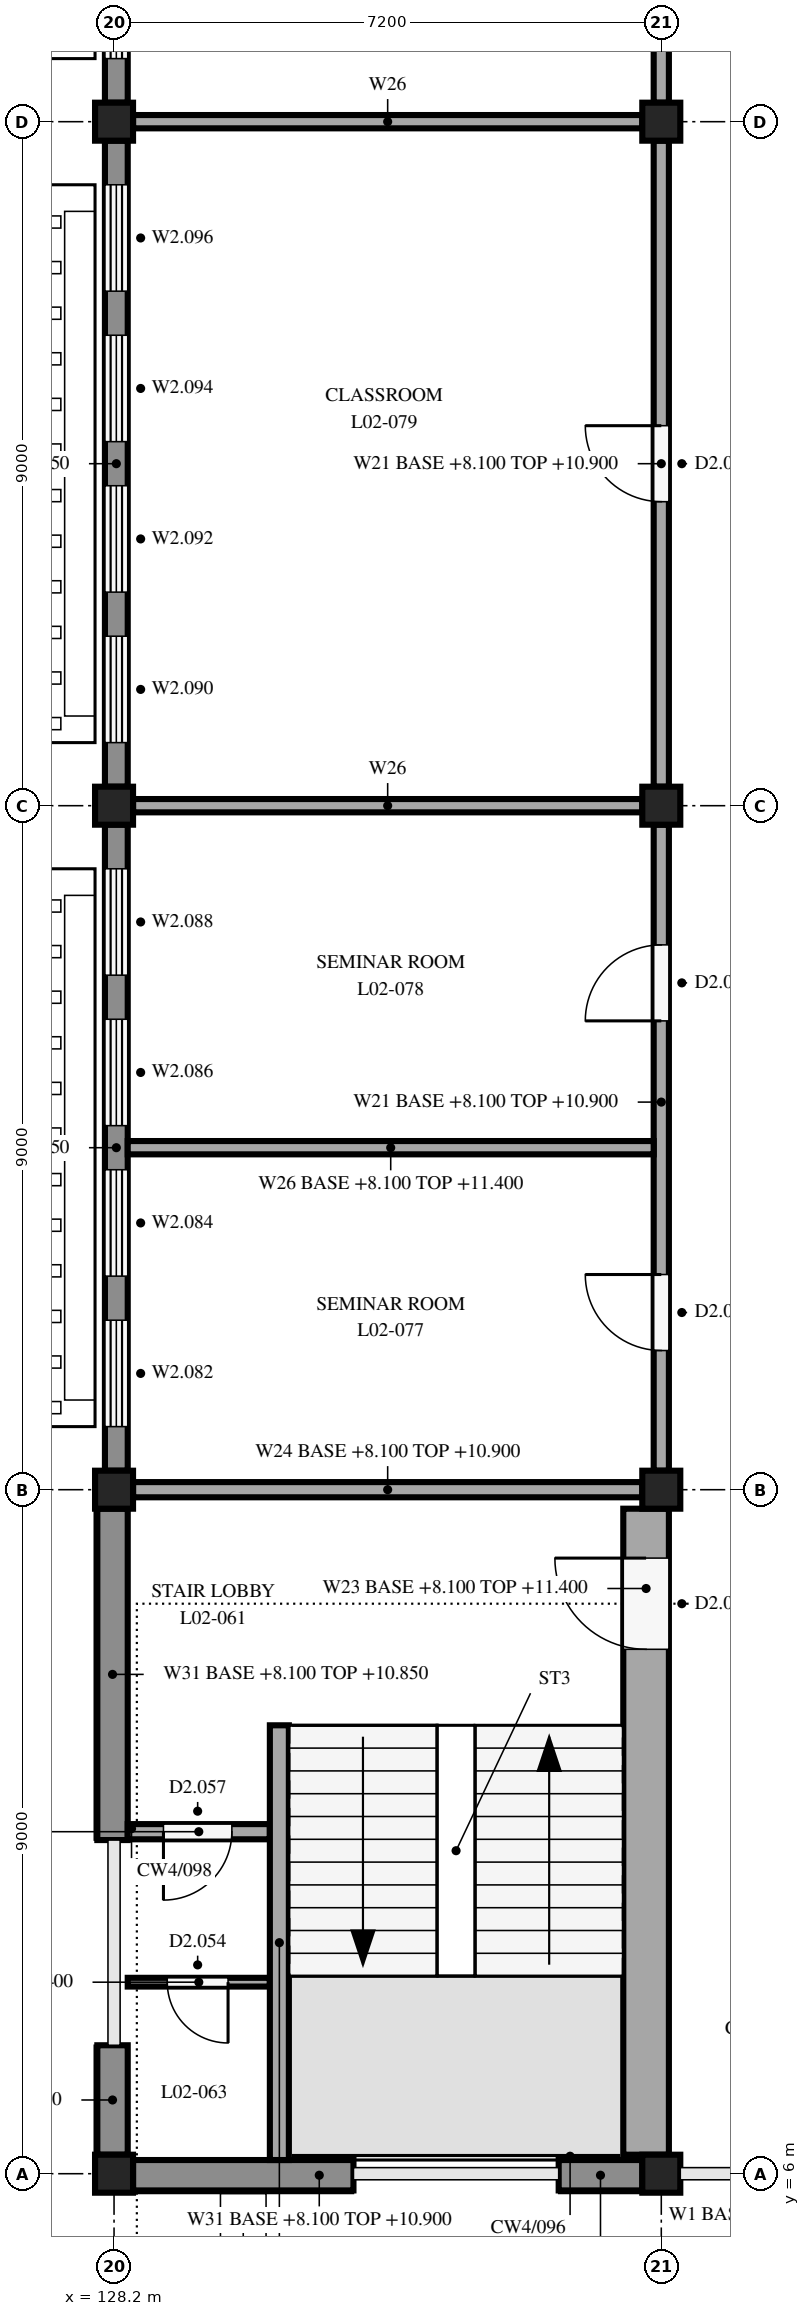
"""IFC4 building model, lengths in metres.
Left out: names, types, materials, properties, quantities, classifications, styles, units other than length and angle.
Written with IfcOpenShell. Run it as: python <this file> out.ifc"""

import sys

from ifc_helpers import new_model, si_unit, direction, frame, frame_2d, origin, origin_2d, place, context, subcontext, project, spatial, rectangle, extrude, element, fill, save


model = new_model("IFC4")
c1 = context("Model", 3, precision=1e-05, world=origin(), true_north=direction((0.0, 1.0)))
c2 = subcontext(c1, "Body", "Model", "MODEL_VIEW")
j1 = project(units=[si_unit("LENGTHUNIT", "METRE"), si_unit("PLANEANGLEUNIT", "RADIAN")], contexts=[c1])
p1 = place(None, origin())
s1 = spatial("IfcSite", under=j1, at=p1, CompositionType="ELEMENT")
p2 = place(p1, origin())
s2 = spatial("IfcBuilding", under=s1, at=p2, CompositionType="ELEMENT")
p3 = place(p2, frame((0.0, 0.0, 8.1)))
s3 = spatial("IfcBuildingStorey", under=s2, at=p3, CompositionType="ELEMENT", Elevation=8.1)
for number, where, z_axis, x_axis in (
    (1, (128.2, 6.0, 0.0), (0.0, 0.0, 1.0), (1.0, 0.0, 0.0)),
    (2, (128.2, 15.0, 0.0), (0.0, 0.0, 1.0), (1.0, 0.0, 0.0)),
    (3, (128.2, 24.0, 0.0), (0.0, 0.0, 1.0), (1.0, 0.0, 0.0)),
    (4, (128.2, 33.0, 0.0), (0.0, 0.0, 1.0), (1.0, 0.0, 0.0)),
    (5, (135.4, 6.0, 0.0), (0.0, 0.0, 1.0), (1.0, 0.0, 0.0)),
    (6, (135.4, 15.0, 0.0), (0.0, 0.0, 1.0), (1.0, 0.0, 0.0)),
    (7, (135.4, 24.0, 0.0), (0.0, 0.0, 1.0), (1.0, 0.0, 0.0)),
    (8, (135.4, 33.0, 0.0), (0.0, 0.0, 1.0), (1.0, 0.0, 0.0)),
):
    element("IfcColumn", number, at=place(p3, frame(where, z_axis=z_axis, x_axis=x_axis)), inside=s3, PredefinedType="COLUMN", context=c2, shape_type="SweptSolid", body=[
        extrude(rectangle(XDim=0.5, YDim=0.5, at=origin_2d()), origin(), (0.0, 0.0, 1.0), 3.3),
    ])
p4 = place(p3, frame((128.18, 6.25, 0.0), z_axis=(0.0, 0.0, 1.0), x_axis=(0.0, 1.0, 0.0)))
e9 = element("IfcWall", 9, at=p4, inside=s3, PredefinedType="STANDARD", context=c2, shape_type="SweptSolid", body=[
    extrude(rectangle(XDim=1.44, YDim=0.4, at=frame_2d((0.72, 0.0))), origin(), (0.0, 0.0, 1.0), 2.75),
])
p5 = place(p3, frame((128.18, 10.39, 0.0), z_axis=(0.0, 0.0, 1.0), x_axis=(0.0, 1.0, 0.0)))
e10 = element("IfcWall", 10, at=p5, inside=s3, PredefinedType="STANDARD", context=c2, shape_type="SweptSolid", body=[
    extrude(rectangle(XDim=4.36, YDim=0.4, at=frame_2d((2.18, 0.0))), origin(), (0.0, 0.0, 1.0), 2.75),
])
p6 = place(p3, frame((128.23, 15.25, 0.0), z_axis=(0.0, 0.0, 1.0), x_axis=(0.0, 1.0, 0.0)))
e11 = element("IfcWall", 11, at=p6, inside=s3, PredefinedType="STANDARD", context=c2, shape_type="SweptSolid", body=[
    extrude(rectangle(XDim=8.5, YDim=0.3, at=frame_2d((4.25, 0.0))), origin(), (0.0, 0.0, 1.0), 2.75),
])
p7 = place(p6, frame((0.58, 0.0, 0.6)))
e12 = element("IfcOpeningElement", 12, at=p7, cuts=e11, PredefinedType="OPENING", context=c2, shape_type="SweptSolid", body=[
    extrude(rectangle(XDim=1.4, YDim=2.1, at=frame_2d((0.7, 1.05))), frame((0.0, 0.16, 0.0), z_axis=(0.0, -1.0, 0.0), x_axis=(1.0, 0.0, 0.0)), (0.0, 0.0, 1.0), 0.32),
])
p8 = place(p6, frame((2.56, 0.0, 0.6)))
e13 = element("IfcOpeningElement", 13, at=p8, cuts=e11, PredefinedType="OPENING", context=c2, shape_type="SweptSolid", body=[
    extrude(rectangle(XDim=1.4, YDim=2.1, at=frame_2d((0.7, 1.05))), frame((0.0, 0.16, 0.0), z_axis=(0.0, -1.0, 0.0), x_axis=(1.0, 0.0, 0.0)), (0.0, 0.0, 1.0), 0.32),
])
p9 = place(p6, frame((4.54, 0.0, 0.6)))
e14 = element("IfcOpeningElement", 14, at=p9, cuts=e11, PredefinedType="OPENING", context=c2, shape_type="SweptSolid", body=[
    extrude(rectangle(XDim=1.4, YDim=2.1, at=frame_2d((0.7, 1.05))), frame((0.0, 0.16, 0.0), z_axis=(0.0, -1.0, 0.0), x_axis=(1.0, 0.0, 0.0)), (0.0, 0.0, 1.0), 0.32),
])
p10 = place(p6, frame((6.52, 0.0, 0.6)))
e15 = element("IfcOpeningElement", 15, at=p10, cuts=e11, PredefinedType="OPENING", context=c2, shape_type="SweptSolid", body=[
    extrude(rectangle(XDim=1.4, YDim=2.1, at=frame_2d((0.7, 1.05))), frame((0.0, 0.16, 0.0), z_axis=(0.0, -1.0, 0.0), x_axis=(1.0, 0.0, 0.0)), (0.0, 0.0, 1.0), 0.32),
])
p11 = place(p3, frame((128.23, 24.25, 0.0), z_axis=(0.0, 0.0, 1.0), x_axis=(0.0, 1.0, 0.0)))
e16 = element("IfcWall", 16, at=p11, inside=s3, PredefinedType="STANDARD", context=c2, shape_type="SweptSolid", body=[
    extrude(rectangle(XDim=8.5, YDim=0.3, at=frame_2d((4.25, 0.0))), origin(), (0.0, 0.0, 1.0), 2.75),
])
p12 = place(p11, frame((0.58, 0.0, 0.6)))
e17 = element("IfcOpeningElement", 17, at=p12, cuts=e16, PredefinedType="OPENING", context=c2, shape_type="SweptSolid", body=[
    extrude(rectangle(XDim=1.4, YDim=2.1, at=frame_2d((0.7, 1.05))), frame((0.0, 0.16, 0.0), z_axis=(0.0, -1.0, 0.0), x_axis=(1.0, 0.0, 0.0)), (0.0, 0.0, 1.0), 0.32),
])
p13 = place(p11, frame((2.56, 0.0, 0.6)))
e18 = element("IfcOpeningElement", 18, at=p13, cuts=e16, PredefinedType="OPENING", context=c2, shape_type="SweptSolid", body=[
    extrude(rectangle(XDim=1.4, YDim=2.1, at=frame_2d((0.7, 1.05))), frame((0.0, 0.16, 0.0), z_axis=(0.0, -1.0, 0.0), x_axis=(1.0, 0.0, 0.0)), (0.0, 0.0, 1.0), 0.32),
])
p14 = place(p11, frame((4.54, 0.0, 0.6)))
e19 = element("IfcOpeningElement", 19, at=p14, cuts=e16, PredefinedType="OPENING", context=c2, shape_type="SweptSolid", body=[
    extrude(rectangle(XDim=1.4, YDim=2.1, at=frame_2d((0.7, 1.05))), frame((0.0, 0.16, 0.0), z_axis=(0.0, -1.0, 0.0), x_axis=(1.0, 0.0, 0.0)), (0.0, 0.0, 1.0), 0.32),
])
p15 = place(p11, frame((6.52, 0.0, 0.6)))
e20 = element("IfcOpeningElement", 20, at=p15, cuts=e16, PredefinedType="OPENING", context=c2, shape_type="SweptSolid", body=[
    extrude(rectangle(XDim=1.4, YDim=2.1, at=frame_2d((0.7, 1.05))), frame((0.0, 0.16, 0.0), z_axis=(0.0, -1.0, 0.0), x_axis=(1.0, 0.0, 0.0)), (0.0, 0.0, 1.0), 0.32),
])
p16 = place(p3, frame((128.23, 33.25, 0.0), z_axis=(0.0, 0.0, 1.0), x_axis=(0.0, 1.0, 0.0)))
e21 = element("IfcWall", 21, at=p16, inside=s3, PredefinedType="STANDARD", context=c2, shape_type="SweptSolid", body=[
    extrude(rectangle(XDim=8.5, YDim=0.3, at=frame_2d((4.25, 0.0))), origin(), (0.0, 0.0, 1.0), 2.75),
])
p17 = place(p16, frame((0.58, 0.0, 0.6)))
e22 = element("IfcOpeningElement", 22, at=p17, cuts=e21, PredefinedType="OPENING", context=c2, shape_type="SweptSolid", body=[
    extrude(rectangle(XDim=1.4, YDim=2.1, at=frame_2d((0.7, 1.05))), frame((0.0, 0.16, 0.0), z_axis=(0.0, -1.0, 0.0), x_axis=(1.0, 0.0, 0.0)), (0.0, 0.0, 1.0), 0.32),
])
p18 = place(p16, frame((2.56, 0.0, 0.6)))
e23 = element("IfcOpeningElement", 23, at=p18, cuts=e21, PredefinedType="OPENING", context=c2, shape_type="SweptSolid", body=[
    extrude(rectangle(XDim=1.4, YDim=2.1, at=frame_2d((0.7, 1.05))), frame((0.0, 0.16, 0.0), z_axis=(0.0, -1.0, 0.0), x_axis=(1.0, 0.0, 0.0)), (0.0, 0.0, 1.0), 0.32),
])
p19 = place(p16, frame((4.54, 0.0, 0.6)))
e24 = element("IfcOpeningElement", 24, at=p19, cuts=e21, PredefinedType="OPENING", context=c2, shape_type="SweptSolid", body=[
    extrude(rectangle(XDim=1.4, YDim=2.1, at=frame_2d((0.7, 1.05))), frame((0.0, 0.16, 0.0), z_axis=(0.0, -1.0, 0.0), x_axis=(1.0, 0.0, 0.0)), (0.0, 0.0, 1.0), 0.32),
])
p20 = place(p16, frame((6.52, 0.0, 0.6)))
e25 = element("IfcOpeningElement", 25, at=p20, cuts=e21, PredefinedType="OPENING", context=c2, shape_type="SweptSolid", body=[
    extrude(rectangle(XDim=1.4, YDim=2.1, at=frame_2d((0.7, 1.05))), frame((0.0, 0.16, 0.0), z_axis=(0.0, -1.0, 0.0), x_axis=(1.0, 0.0, 0.0)), (0.0, 0.0, 1.0), 0.32),
])
p21 = place(p3, frame((131.35, 5.98, 0.0), z_axis=(0.0, 0.0, 1.0), x_axis=(-1.0, 0.0, 0.0)))
e26 = element("IfcWall", 26, at=p21, inside=s3, PredefinedType="STANDARD", context=c2, shape_type="SweptSolid", body=[
    extrude(rectangle(XDim=2.9, YDim=0.4, at=frame_2d((1.45, 0.0))), origin(), (0.0, 0.0, 1.0), 2.8),
])
p22 = place(p3, frame((135.15, 5.98, 0.0), z_axis=(0.0, 0.0, 1.0), x_axis=(-1.0, 0.0, 0.0)))
e27 = element("IfcWall", 27, at=p22, inside=s3, PredefinedType="STANDARD", context=c2, shape_type="SweptSolid", body=[
    extrude(rectangle(XDim=1.1, YDim=0.4, at=frame_2d((0.55, 0.0))), origin(), (0.0, 0.0, 1.0), 2.8),
])
p23 = place(p3, frame((130.375, 6.18, 0.0), z_axis=(0.0, 0.0, 1.0), x_axis=(0.0, 1.0, 0.0)))
e28 = element("IfcWall", 28, at=p23, inside=s3, PredefinedType="SOLIDWALL", context=c2, shape_type="SweptSolid", body=[
    extrude(rectangle(XDim=5.72, YDim=0.25, at=frame_2d((2.86, 0.0))), origin(), (0.0, 0.0, 1.0), 3.3),
])
p24 = place(p3, frame((135.2, 6.25, 0.0), z_axis=(0.0, 0.0, 1.0), x_axis=(0.0, 1.0, 0.0)))
e29 = element("IfcWall", 29, at=p24, inside=s3, PredefinedType="SOLIDWALL", context=c2, shape_type="SweptSolid", body=[
    extrude(rectangle(XDim=8.5, YDim=0.6, at=frame_2d((4.25, 0.0))), origin(), (0.0, 0.0, 1.0), 3.3),
])
p25 = place(p24, frame((6.65, 0.0, 0.0)))
e30 = element("IfcOpeningElement", 30, at=p25, cuts=e29, PredefinedType="OPENING", context=c2, shape_type="SweptSolid", body=[
    extrude(rectangle(XDim=1.2, YDim=2.1, at=frame_2d((0.6, 1.05))), frame((0.0, 0.31, 0.0), z_axis=(0.0, -1.0, 0.0), x_axis=(1.0, 0.0, 0.0)), (0.0, 0.0, 1.0), 0.62),
])
p26 = place(p3, frame((130.25, 10.5, 0.0), z_axis=(0.0, 0.0, 1.0), x_axis=(-1.0, 0.0, 0.0)))
e31 = element("IfcWall", 31, at=p26, inside=s3, PredefinedType="SOLIDWALL", context=c2, shape_type="SweptSolid", body=[
    extrude(rectangle(XDim=1.87, YDim=0.2, at=frame_2d((0.935, 0.0))), origin(), (0.0, 0.0, 1.0), 3.3),
])
p27 = place(p26, frame((0.5, 0.0, 0.0)))
e32 = element("IfcOpeningElement", 32, at=p27, cuts=e31, PredefinedType="OPENING", context=c2, shape_type="SweptSolid", body=[
    extrude(rectangle(XDim=0.9, YDim=2.1, at=frame_2d((0.45, 1.05))), frame((0.0, 0.11, 0.0), z_axis=(0.0, -1.0, 0.0), x_axis=(1.0, 0.0, 0.0)), (0.0, 0.0, 1.0), 0.22),
])
p28 = place(p3, frame((130.25, 8.52, 0.0), z_axis=(0.0, 0.0, 1.0), x_axis=(-1.0, 0.0, 0.0)))
e33 = element("IfcWall", 33, at=p28, inside=s3, PredefinedType="PARTITIONING", context=c2, shape_type="SweptSolid", body=[
    extrude(rectangle(XDim=1.87, YDim=0.115, at=frame_2d((0.935, 0.0))), origin(), (0.0, 0.0, 1.0), 3.3),
])
p29 = place(p28, frame((0.55, 0.0, 0.0)))
e34 = element("IfcOpeningElement", 34, at=p29, cuts=e33, PredefinedType="OPENING", context=c2, shape_type="SweptSolid", body=[
    extrude(rectangle(XDim=0.8, YDim=2.1, at=frame_2d((0.4, 1.05))), frame((0.0, 0.067, 0.0), z_axis=(0.0, -1.0, 0.0), x_axis=(1.0, 0.0, 0.0)), (0.0, 0.0, 1.0), 0.135),
])
p30 = place(p3, frame((128.45, 15.0, 0.0), z_axis=(0.0, 0.0, 1.0), x_axis=(1.0, 0.0, 0.0)))
e35 = element("IfcWall", 35, at=p30, inside=s3, PredefinedType="SOLIDWALL", context=c2, shape_type="SweptSolid", body=[
    extrude(rectangle(XDim=6.7, YDim=0.2, at=frame_2d((3.35, 0.0))), origin(), (0.0, 0.0, 1.0), 2.8),
])
p31 = place(p3, frame((135.4, 15.25, 0.0), z_axis=(0.0, 0.0, 1.0), x_axis=(0.0, 1.0, 0.0)))
e36 = element("IfcWall", 36, at=p31, inside=s3, PredefinedType="PARTITIONING", context=c2, shape_type="SweptSolid", body=[
    extrude(rectangle(XDim=8.5, YDim=0.2, at=frame_2d((4.25, 0.0))), origin(), (0.0, 0.0, 1.0), 2.8),
])
p32 = place(p31, frame((1.581, 0.0, 0.0)))
e37 = element("IfcOpeningElement", 37, at=p32, cuts=e36, PredefinedType="OPENING", context=c2, shape_type="SweptSolid", body=[
    extrude(rectangle(XDim=1.0, YDim=2.1, at=frame_2d((0.5, 1.05))), frame((0.0, 0.11, 0.0), z_axis=(0.0, -1.0, 0.0), x_axis=(1.0, 0.0, 0.0)), (0.0, 0.0, 1.0), 0.22),
])
p33 = place(p31, frame((5.919, 0.0, 0.0)))
e38 = element("IfcOpeningElement", 38, at=p33, cuts=e36, PredefinedType="OPENING", context=c2, shape_type="SweptSolid", body=[
    extrude(rectangle(XDim=1.0, YDim=2.1, at=frame_2d((0.5, 1.05))), frame((0.0, 0.11, 0.0), z_axis=(0.0, -1.0, 0.0), x_axis=(1.0, 0.0, 0.0)), (0.0, 0.0, 1.0), 0.22),
])
p34 = place(p3, frame((135.4, 24.25, 0.0), z_axis=(0.0, 0.0, 1.0), x_axis=(0.0, 1.0, 0.0)))
e39 = element("IfcWall", 39, at=p34, inside=s3, PredefinedType="PARTITIONING", context=c2, shape_type="SweptSolid", body=[
    extrude(rectangle(XDim=8.5, YDim=0.2, at=frame_2d((4.25, 0.0))), origin(), (0.0, 0.0, 1.0), 2.8),
])
p35 = place(p34, frame((3.75, 0.0, 0.0)))
e40 = element("IfcOpeningElement", 40, at=p35, cuts=e39, PredefinedType="OPENING", context=c2, shape_type="SweptSolid", body=[
    extrude(rectangle(XDim=1.0, YDim=2.1, at=frame_2d((0.5, 1.05))), frame((0.0, 0.11, 0.0), z_axis=(0.0, -1.0, 0.0), x_axis=(1.0, 0.0, 0.0)), (0.0, 0.0, 1.0), 0.22),
])
p36 = place(p3, frame((135.4, 33.25, 0.0), z_axis=(0.0, 0.0, 1.0), x_axis=(0.0, 1.0, 0.0)))
e41 = element("IfcWall", 41, at=p36, inside=s3, PredefinedType="PARTITIONING", context=c2, shape_type="SweptSolid", body=[
    extrude(rectangle(XDim=8.5, YDim=0.2, at=frame_2d((4.25, 0.0))), origin(), (0.0, 0.0, 1.0), 2.8),
])
p37 = place(p36, frame((3.75, 0.0, 0.0)))
e42 = element("IfcOpeningElement", 42, at=p37, cuts=e41, PredefinedType="OPENING", context=c2, shape_type="SweptSolid", body=[
    extrude(rectangle(XDim=1.0, YDim=2.1, at=frame_2d((0.5, 1.05))), frame((0.0, 0.11, 0.0), z_axis=(0.0, -1.0, 0.0), x_axis=(1.0, 0.0, 0.0)), (0.0, 0.0, 1.0), 0.22),
])
p38 = place(p3, frame((128.38, 19.5, 0.0), z_axis=(0.0, 0.0, 1.0), x_axis=(1.0, 0.0, 0.0)))
e43 = element("IfcWall", 43, at=p38, inside=s3, PredefinedType="PARTITIONING", context=c2, shape_type="SweptSolid", body=[
    extrude(rectangle(XDim=6.92, YDim=0.175, at=frame_2d((3.46, 0.0))), origin(), (0.0, 0.0, 1.0), 3.3),
])
for number, where, z_axis, x_axis in (
    (44, (128.45, 24.0, 0.0), (0.0, 0.0, 1.0), (1.0, 0.0, 0.0)),
    (45, (128.45, 33.0, 0.0), (0.0, 0.0, 1.0), (1.0, 0.0, 0.0)),
):
    element("IfcWall", number, at=place(p3, frame(where, z_axis=z_axis, x_axis=x_axis)), inside=s3, PredefinedType="PARTITIONING", context=c2, shape_type="SweptSolid", body=[
        extrude(rectangle(XDim=6.7, YDim=0.175, at=frame_2d((3.35, 0.0))), origin(), (0.0, 0.0, 1.0), 2.8),
    ])
p39 = place(p7, origin())
e46 = element("IfcWindow", 46, at=p39, inside=s3, PartitioningType="DOUBLE_PANEL_VERTICAL", PredefinedType="WINDOW", context=c2, shape_type="SweptSolid", body=[
    extrude(rectangle(XDim=1.4, YDim=2.1, at=frame_2d((0.7, 1.05))), frame((0.0, 0.03, 0.0), z_axis=(0.0, -1.0, 0.0), x_axis=(1.0, 0.0, 0.0)), (0.0, 0.0, 1.0), 0.06),
])
fill(e12, e46)
p40 = place(p8, origin())
e47 = element("IfcWindow", 47, at=p40, inside=s3, PartitioningType="DOUBLE_PANEL_VERTICAL", PredefinedType="WINDOW", context=c2, shape_type="SweptSolid", body=[
    extrude(rectangle(XDim=1.4, YDim=2.1, at=frame_2d((0.7, 1.05))), frame((0.0, 0.03, 0.0), z_axis=(0.0, -1.0, 0.0), x_axis=(1.0, 0.0, 0.0)), (0.0, 0.0, 1.0), 0.06),
])
fill(e13, e47)
p41 = place(p9, origin())
e48 = element("IfcWindow", 48, at=p41, inside=s3, PartitioningType="DOUBLE_PANEL_VERTICAL", PredefinedType="WINDOW", context=c2, shape_type="SweptSolid", body=[
    extrude(rectangle(XDim=1.4, YDim=2.1, at=frame_2d((0.7, 1.05))), frame((0.0, 0.03, 0.0), z_axis=(0.0, -1.0, 0.0), x_axis=(1.0, 0.0, 0.0)), (0.0, 0.0, 1.0), 0.06),
])
fill(e14, e48)
p42 = place(p10, origin())
e49 = element("IfcWindow", 49, at=p42, inside=s3, PartitioningType="DOUBLE_PANEL_VERTICAL", PredefinedType="WINDOW", context=c2, shape_type="SweptSolid", body=[
    extrude(rectangle(XDim=1.4, YDim=2.1, at=frame_2d((0.7, 1.05))), frame((0.0, 0.03, 0.0), z_axis=(0.0, -1.0, 0.0), x_axis=(1.0, 0.0, 0.0)), (0.0, 0.0, 1.0), 0.06),
])
fill(e15, e49)
p43 = place(p12, origin())
e50 = element("IfcWindow", 50, at=p43, inside=s3, PartitioningType="DOUBLE_PANEL_VERTICAL", PredefinedType="WINDOW", context=c2, shape_type="SweptSolid", body=[
    extrude(rectangle(XDim=1.4, YDim=2.1, at=frame_2d((0.7, 1.05))), frame((0.0, 0.03, 0.0), z_axis=(0.0, -1.0, 0.0), x_axis=(1.0, 0.0, 0.0)), (0.0, 0.0, 1.0), 0.06),
])
fill(e17, e50)
p44 = place(p13, origin())
e51 = element("IfcWindow", 51, at=p44, inside=s3, PartitioningType="DOUBLE_PANEL_VERTICAL", PredefinedType="WINDOW", context=c2, shape_type="SweptSolid", body=[
    extrude(rectangle(XDim=1.4, YDim=2.1, at=frame_2d((0.7, 1.05))), frame((0.0, 0.03, 0.0), z_axis=(0.0, -1.0, 0.0), x_axis=(1.0, 0.0, 0.0)), (0.0, 0.0, 1.0), 0.06),
])
fill(e18, e51)
p45 = place(p14, origin())
e52 = element("IfcWindow", 52, at=p45, inside=s3, PartitioningType="DOUBLE_PANEL_VERTICAL", PredefinedType="WINDOW", context=c2, shape_type="SweptSolid", body=[
    extrude(rectangle(XDim=1.4, YDim=2.1, at=frame_2d((0.7, 1.05))), frame((0.0, 0.03, 0.0), z_axis=(0.0, -1.0, 0.0), x_axis=(1.0, 0.0, 0.0)), (0.0, 0.0, 1.0), 0.06),
])
fill(e19, e52)
p46 = place(p15, origin())
e53 = element("IfcWindow", 53, at=p46, inside=s3, PartitioningType="DOUBLE_PANEL_VERTICAL", PredefinedType="WINDOW", context=c2, shape_type="SweptSolid", body=[
    extrude(rectangle(XDim=1.4, YDim=2.1, at=frame_2d((0.7, 1.05))), frame((0.0, 0.03, 0.0), z_axis=(0.0, -1.0, 0.0), x_axis=(1.0, 0.0, 0.0)), (0.0, 0.0, 1.0), 0.06),
])
fill(e20, e53)
p47 = place(p17, origin())
e54 = element("IfcWindow", 54, at=p47, inside=s3, PartitioningType="DOUBLE_PANEL_VERTICAL", PredefinedType="WINDOW", context=c2, shape_type="SweptSolid", body=[
    extrude(rectangle(XDim=1.4, YDim=2.1, at=frame_2d((0.7, 1.05))), frame((0.0, 0.03, 0.0), z_axis=(0.0, -1.0, 0.0), x_axis=(1.0, 0.0, 0.0)), (0.0, 0.0, 1.0), 0.06),
])
fill(e22, e54)
p48 = place(p25, origin())
e55 = element("IfcDoor", 55, at=p48, inside=s3, OperationType="SINGLE_SWING_RIGHT", PredefinedType="DOOR", context=c2, shape_type="SweptSolid", body=[
    extrude(rectangle(XDim=1.2, YDim=2.1, at=frame_2d((0.6, 1.05))), frame((0.0, 0.025, 0.0), z_axis=(0.0, -1.0, 0.0), x_axis=(1.0, 0.0, 0.0)), (0.0, 0.0, 1.0), 0.05),
])
fill(e30, e55)
p49 = place(p27, origin())
e56 = element("IfcDoor", 56, at=p49, inside=s3, OperationType="SINGLE_SWING_RIGHT", PredefinedType="DOOR", context=c2, shape_type="SweptSolid", body=[
    extrude(rectangle(XDim=0.9, YDim=2.1, at=frame_2d((0.45, 1.05))), frame((0.0, 0.025, 0.0), z_axis=(0.0, -1.0, 0.0), x_axis=(1.0, 0.0, 0.0)), (0.0, 0.0, 1.0), 0.05),
])
fill(e32, e56)
p50 = place(p29, origin())
e57 = element("IfcDoor", 57, at=p50, inside=s3, OperationType="SINGLE_SWING_LEFT", PredefinedType="DOOR", context=c2, shape_type="SweptSolid", body=[
    extrude(rectangle(XDim=0.8, YDim=2.1, at=frame_2d((0.4, 1.05))), frame((0.0, 0.025, 0.0), z_axis=(0.0, -1.0, 0.0), x_axis=(1.0, 0.0, 0.0)), (0.0, 0.0, 1.0), 0.05),
])
fill(e34, e57)
p51 = place(p32, origin())
e58 = element("IfcDoor", 58, at=p51, inside=s3, OperationType="SINGLE_SWING_RIGHT", PredefinedType="DOOR", context=c2, shape_type="SweptSolid", body=[
    extrude(rectangle(XDim=1.0, YDim=2.1, at=frame_2d((0.5, 1.05))), frame((0.0, 0.025, 0.0), z_axis=(0.0, -1.0, 0.0), x_axis=(1.0, 0.0, 0.0)), (0.0, 0.0, 1.0), 0.05),
])
fill(e37, e58)
p52 = place(p33, origin())
e59 = element("IfcDoor", 59, at=p52, inside=s3, OperationType="SINGLE_SWING_LEFT", PredefinedType="DOOR", context=c2, shape_type="SweptSolid", body=[
    extrude(rectangle(XDim=1.0, YDim=2.1, at=frame_2d((0.5, 1.05))), frame((0.0, 0.025, 0.0), z_axis=(0.0, -1.0, 0.0), x_axis=(1.0, 0.0, 0.0)), (0.0, 0.0, 1.0), 0.05),
])
fill(e38, e59)
p53 = place(p35, origin())
e60 = element("IfcDoor", 60, at=p53, inside=s3, OperationType="SINGLE_SWING_RIGHT", PredefinedType="DOOR", context=c2, shape_type="SweptSolid", body=[
    extrude(rectangle(XDim=1.0, YDim=2.1, at=frame_2d((0.5, 1.05))), frame((0.0, 0.025, 0.0), z_axis=(0.0, -1.0, 0.0), x_axis=(1.0, 0.0, 0.0)), (0.0, 0.0, 1.0), 0.05),
])
fill(e40, e60)
save(model, sys.argv[1])
